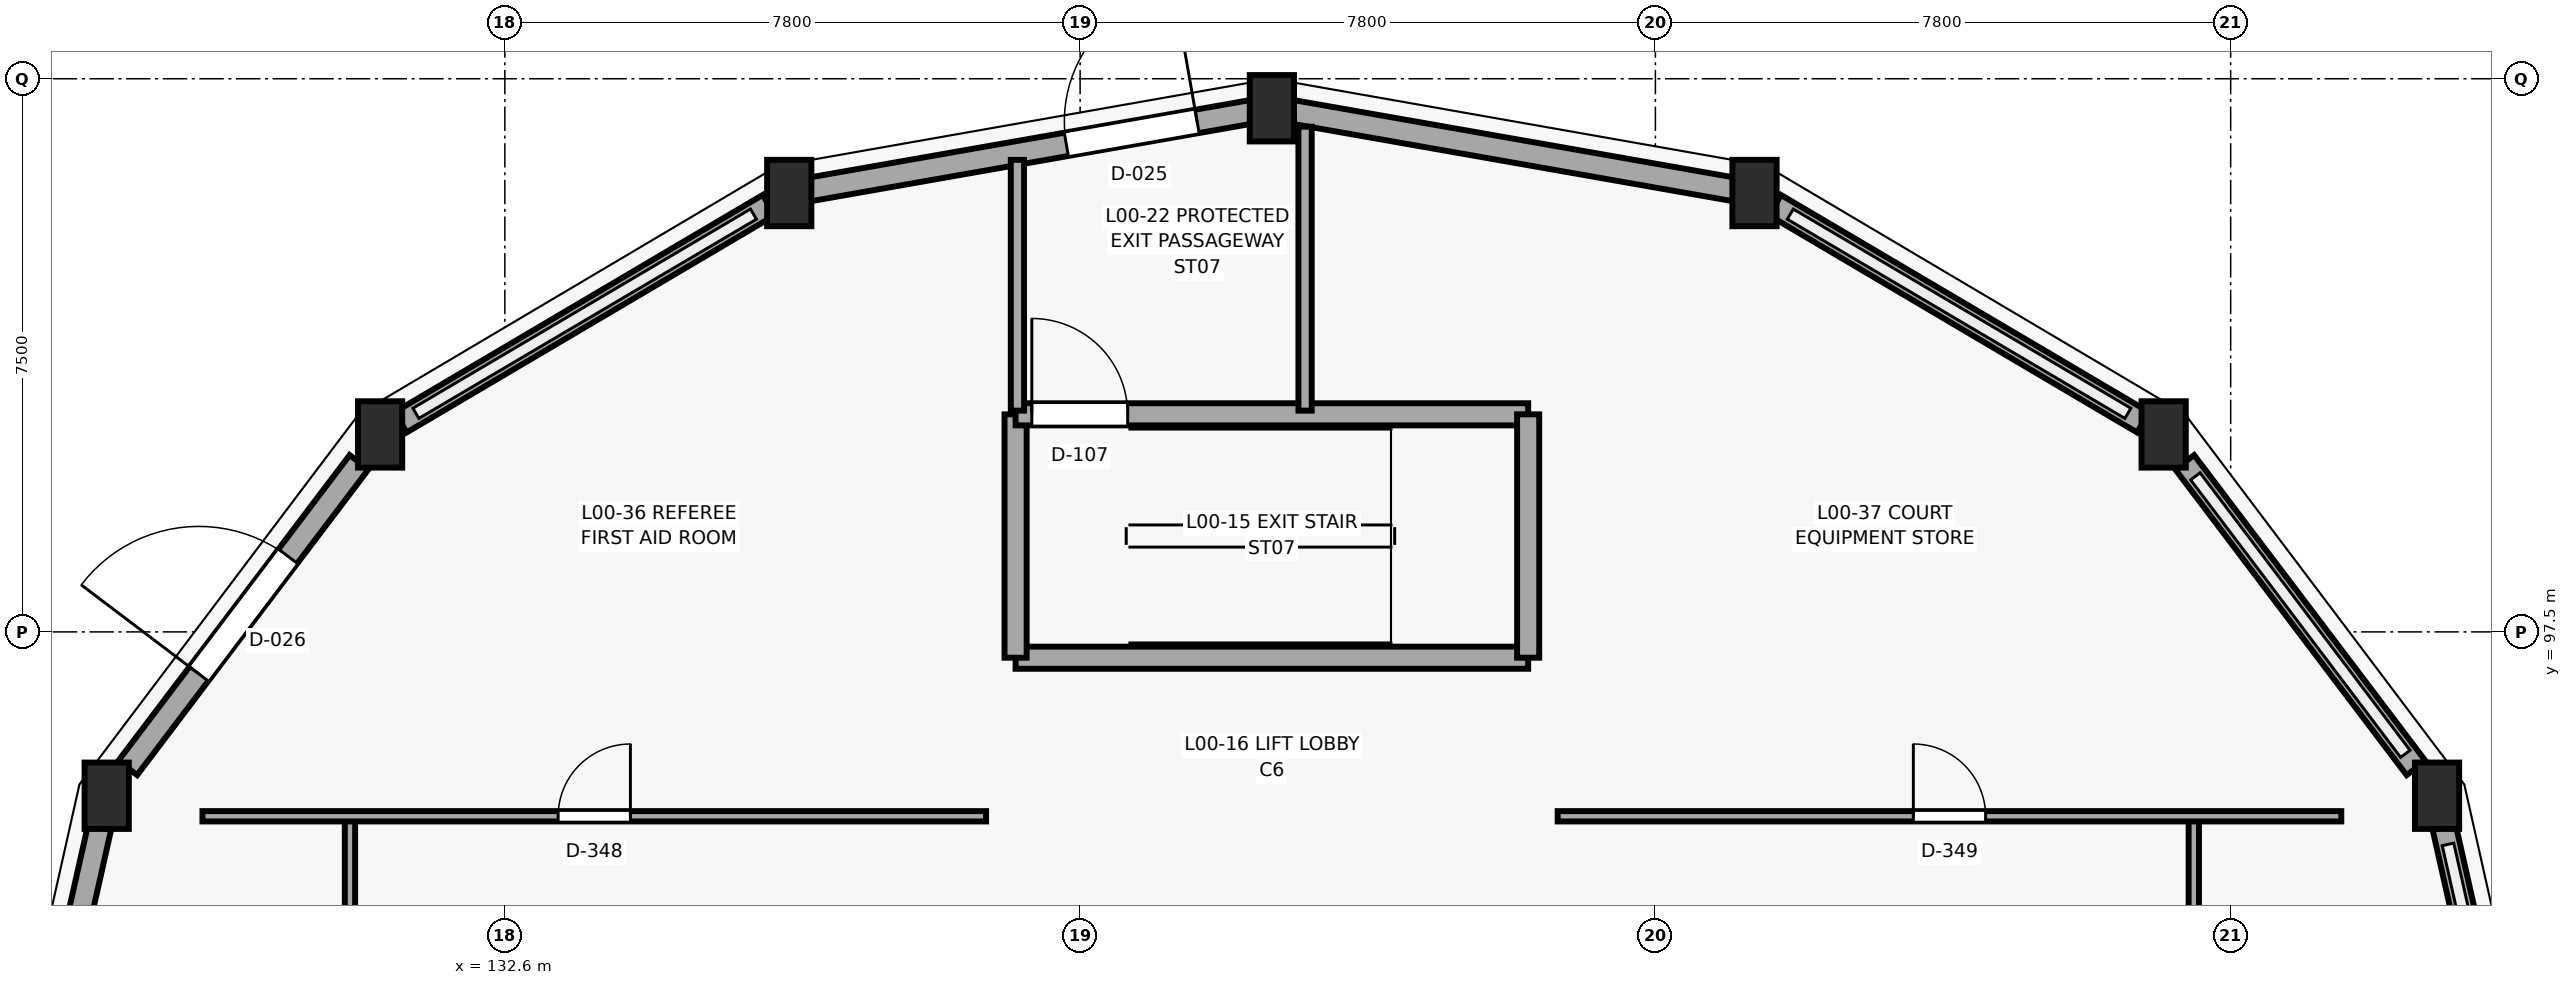
"""IFC4 building model, lengths in metres.
Left out: names, types, materials, properties, quantities, classifications, styles, units other than length and angle.
Written with IfcOpenShell. Run it as: python <this file> out.ifc"""

import sys

from ifc_helpers import new_model, si_unit, direction, frame, frame_2d, origin, origin_2d, place, context, subcontext, project, spatial, rectangle, extrude, element, fill, save


model = new_model("IFC4")
c1 = context("Model", 3, precision=1e-05, world=origin(), true_north=direction((0.0, 1.0)))
c2 = subcontext(c1, "Body", "Model", "MODEL_VIEW")
j1 = project(units=[si_unit("LENGTHUNIT", "METRE"), si_unit("PLANEANGLEUNIT", "RADIAN")], contexts=[c1])
p1 = place(None, origin())
s1 = spatial("IfcSite", under=j1, at=p1, CompositionType="ELEMENT")
p2 = place(p1, origin())
s2 = spatial("IfcBuilding", under=s1, at=p2, CompositionType="ELEMENT")
p3 = place(p2, origin())
s3 = spatial("IfcBuildingStorey", under=s2, at=p3, CompositionType="ELEMENT", Elevation=0.0)
for number, where, z_axis, x_axis in (
    (1, (158.798, 95.279, 0.0), (0.0, 0.0, 1.0), (1.0, 0.0, 0.0)),
    (2, (155.092, 100.177, 0.0), (0.0, 0.0, 1.0), (1.0, 0.0, 0.0)),
    (3, (149.544, 103.451, 0.0), (0.0, 0.0, 1.0), (1.0, 0.0, 0.0)),
    (4, (143.0, 104.6, 0.0), (0.0, 0.0, 1.0), (1.0, 0.0, 0.0)),
    (5, (136.456, 103.451, 0.0), (0.0, 0.0, 1.0), (1.0, 0.0, 0.0)),
    (6, (130.908, 100.177, 0.0), (0.0, 0.0, 1.0), (1.0, 0.0, 0.0)),
    (7, (127.202, 95.279, 0.0), (0.0, 0.0, 1.0), (1.0, 0.0, 0.0)),
):
    element("IfcColumn", number, at=place(p3, frame(where, z_axis=z_axis, x_axis=x_axis)), inside=s3, PredefinedType="COLUMN", context=c2, shape_type="SweptSolid", body=[
        extrude(rectangle(XDim=0.6, YDim=0.9, at=origin_2d()), origin(), (0.0, 0.0, 1.0), 4.5),
    ])
p4 = place(p3, frame((158.894, 94.853, 0.0), z_axis=(0.0, 0.0, 1.0), x_axis=(0.219744533343, -0.97555745093, 0.0)))
e8 = element("IfcWall", 8, at=p4, inside=s3, PredefinedType="STANDARD", context=c2, shape_type="SweptSolid", body=[
    extrude(rectangle(XDim=5.051, YDim=0.32, at=frame_2d((2.525, 0.0))), origin(), (0.0, 0.0, 1.0), 0.85),
])
p5 = place(p3, frame((155.376, 99.801, 0.0), z_axis=(0.0, 0.0, 1.0), x_axis=(0.603398282319, -0.797439974477, 0.0)))
e9 = element("IfcWall", 9, at=p5, inside=s3, PredefinedType="STANDARD", context=c2, shape_type="SweptSolid", body=[
    extrude(rectangle(XDim=5.199, YDim=0.32, at=frame_2d((2.599, 0.0))), origin(), (0.0, 0.0, 1.0), 0.85),
])
p6 = place(p3, frame((149.823, 103.286, 0.0), z_axis=(0.0, 0.0, 1.0), x_axis=(0.861235880181, -0.508205429614, 0.0)))
e10 = element("IfcWall", 10, at=p6, inside=s3, PredefinedType="STANDARD", context=c2, shape_type="SweptSolid", body=[
    extrude(rectangle(XDim=5.794, YDim=0.32, at=frame_2d((2.897, 0.0))), origin(), (0.0, 0.0, 1.0), 0.85),
])
p7 = place(p3, frame((143.275, 104.552, 0.0), z_axis=(0.0, 0.0, 1.0), x_axis=(0.984927418504, -0.172968148166, 0.0)))
e11 = element("IfcWall", 11, at=p7, inside=s3, PredefinedType="STANDARD", context=c2, shape_type="SweptSolid", body=[
    extrude(rectangle(XDim=6.085, YDim=0.32, at=frame_2d((3.042, 0.0))), origin(), (0.0, 0.0, 1.0), 3.445),
])
p8 = place(p7, frame((2.592, 0.0, 0.9)))
e12 = element("IfcOpeningElement", 12, at=p8, cuts=e11, PredefinedType="OPENING", context=c2, shape_type="SweptSolid", body=[
    extrude(rectangle(XDim=0.9, YDim=0.9, at=frame_2d((0.45, 0.45))), frame((0.0, 0.17, 0.0), z_axis=(0.0, -1.0, 0.0), x_axis=(1.0, 0.0, 0.0)), (0.0, 0.0, 1.0), 0.34),
])
p9 = place(p3, frame((136.731, 103.499, 0.0), z_axis=(0.0, 0.0, 1.0), x_axis=(0.984927418504, 0.172968148166, 0.0)))
e13 = element("IfcWall", 13, at=p9, inside=s3, PredefinedType="STANDARD", context=c2, shape_type="SweptSolid", body=[
    extrude(rectangle(XDim=6.085, YDim=0.32, at=frame_2d((3.042, 0.0))), origin(), (0.0, 0.0, 1.0), 3.445),
])
p10 = place(p9, frame((3.535, 0.0, 0.0)))
e14 = element("IfcOpeningElement", 14, at=p10, cuts=e13, PredefinedType="OPENING", context=c2, shape_type="SweptSolid", body=[
    extrude(rectangle(XDim=1.8, YDim=2.25, at=frame_2d((0.9, 1.125))), frame((0.0, 0.17, 0.0), z_axis=(0.0, -1.0, 0.0), x_axis=(1.0, 0.0, 0.0)), (0.0, 0.0, 1.0), 0.34),
])
p11 = place(p3, frame((131.187, 100.342, 0.0), z_axis=(0.0, 0.0, 1.0), x_axis=(0.861235880181, 0.508205429614, 0.0)))
e15 = element("IfcWall", 15, at=p11, inside=s3, PredefinedType="STANDARD", context=c2, shape_type="SweptSolid", body=[
    extrude(rectangle(XDim=5.794, YDim=0.32, at=frame_2d((2.897, 0.0))), origin(), (0.0, 0.0, 1.0), 0.85),
])
p12 = place(p3, frame((127.487, 95.655, 0.0), z_axis=(0.0, 0.0, 1.0), x_axis=(0.603398282319, 0.797439974477, 0.0)))
e16 = element("IfcWall", 16, at=p12, inside=s3, PredefinedType="STANDARD", context=c2, shape_type="SweptSolid", body=[
    extrude(rectangle(XDim=5.199, YDim=0.32, at=frame_2d((2.599, 0.0))), origin(), (0.0, 0.0, 1.0), 3.445),
])
p13 = place(p12, frame((1.599, 0.0, 0.0)))
e17 = element("IfcOpeningElement", 17, at=p13, cuts=e16, PredefinedType="OPENING", context=c2, shape_type="SweptSolid", body=[
    extrude(rectangle(XDim=2.0, YDim=2.3, at=frame_2d((1.0, 1.15))), frame((0.0, 0.17, 0.0), z_axis=(0.0, -1.0, 0.0), x_axis=(1.0, 0.0, 0.0)), (0.0, 0.0, 1.0), 0.34),
])
p14 = place(p3, frame((125.996, 89.926, 0.0), z_axis=(0.0, 0.0, 1.0), x_axis=(0.219744533343, 0.97555745093, 0.0)))
e18 = element("IfcWall", 18, at=p14, inside=s3, PredefinedType="STANDARD", context=c2, shape_type="SweptSolid", body=[
    extrude(rectangle(XDim=5.051, YDim=0.32, at=frame_2d((2.525, 0.0))), origin(), (0.0, 0.0, 1.0), 3.445),
])
p15 = place(p14, frame((1.45, 0.0, 0.9)))
e19 = element("IfcOpeningElement", 19, at=p15, cuts=e18, PredefinedType="OPENING", context=c2, shape_type="SweptSolid", body=[
    extrude(rectangle(XDim=2.15, YDim=1.55, at=frame_2d((1.075, 0.775))), frame((0.0, 0.17, 0.0), z_axis=(0.0, -1.0, 0.0), x_axis=(1.0, 0.0, 0.0)), (0.0, 0.0, 1.0), 0.34),
])
p16 = place(p3, frame((146.475, 97.15, 0.0), z_axis=(0.0, 0.0, 1.0), x_axis=(-1.0, 0.0, 0.0)))
e20 = element("IfcWall", 20, at=p16, inside=s3, PredefinedType="SHEAR", context=c2, shape_type="SweptSolid", body=[
    extrude(rectangle(XDim=6.95, YDim=0.3, at=frame_2d((3.475, 0.0))), origin(), (0.0, 0.0, 1.0), 4.5),
])
p17 = place(p3, frame((139.525, 97.15, 0.0), z_axis=(0.0, 0.0, 1.0), x_axis=(0.0, 1.0, 0.0)))
e21 = element("IfcWall", 21, at=p17, inside=s3, PredefinedType="SHEAR", context=c2, shape_type="SweptSolid", body=[
    extrude(rectangle(XDim=3.3, YDim=0.3, at=frame_2d((1.65, 0.0))), origin(), (0.0, 0.0, 1.0), 4.5),
])
p18 = place(p3, frame((139.525, 100.45, 0.0), z_axis=(0.0, 0.0, 1.0), x_axis=(1.0, 0.0, 0.0)))
e22 = element("IfcWall", 22, at=p18, inside=s3, PredefinedType="SHEAR", context=c2, shape_type="SweptSolid", body=[
    extrude(rectangle(XDim=6.95, YDim=0.3, at=frame_2d((3.475, 0.0))), origin(), (0.0, 0.0, 1.0), 4.5),
])
p19 = place(p18, frame((0.22, 0.0, 0.0)))
e23 = element("IfcOpeningElement", 23, at=p19, cuts=e22, PredefinedType="OPENING", context=c2, shape_type="SweptSolid", body=[
    extrude(rectangle(XDim=1.3, YDim=2.15, at=frame_2d((0.65, 1.075))), frame((0.0, 0.16, 0.0), z_axis=(0.0, -1.0, 0.0), x_axis=(1.0, 0.0, 0.0)), (0.0, 0.0, 1.0), 0.32),
])
p20 = place(p3, frame((146.475, 100.45, 0.0), z_axis=(0.0, 0.0, 1.0), x_axis=(0.0, -1.0, 0.0)))
e24 = element("IfcWall", 24, at=p20, inside=s3, PredefinedType="SHEAR", context=c2, shape_type="SweptSolid", body=[
    extrude(rectangle(XDim=3.3, YDim=0.3, at=frame_2d((1.65, 0.0))), origin(), (0.0, 0.0, 1.0), 4.5),
])
p21 = place(p3, frame((139.55, 100.5, 0.0), z_axis=(0.0, 0.0, 1.0), x_axis=(0.0, 1.0, 0.0)))
e25 = element("IfcWall", 25, at=p21, inside=s3, PredefinedType="PARTITIONING", context=c2, shape_type="SweptSolid", body=[
    extrude(rectangle(XDim=3.4, YDim=0.18, at=frame_2d((1.7, 0.0))), origin(), (0.0, 0.0, 1.0), 4.255),
])
p22 = place(p3, frame((143.45, 100.5, 0.0), z_axis=(0.0, 0.0, 1.0), x_axis=(0.0, 1.0, 0.0)))
e26 = element("IfcWall", 26, at=p22, inside=s3, PredefinedType="PARTITIONING", context=c2, shape_type="SweptSolid", body=[
    extrude(rectangle(XDim=3.85, YDim=0.18, at=frame_2d((1.925, 0.0))), origin(), (0.0, 0.0, 1.0), 4.255),
])
p23 = place(p3, frame((130.5, 78.0, 0.0), z_axis=(0.0, 0.0, 1.0), x_axis=(0.0, 1.0, 0.0)))
e27 = element("IfcWall", 27, at=p23, inside=s3, PredefinedType="PARTITIONING", context=c2, shape_type="SweptSolid", body=[
    extrude(rectangle(XDim=17.0, YDim=0.14, at=frame_2d((8.5, 0.0))), origin(), (0.0, 0.0, 1.0), 4.255),
])
p24 = place(p23, frame((7.94, 0.0, 0.0)))
e28 = element("IfcOpeningElement", 28, at=p24, cuts=e27, PredefinedType="OPENING", context=c2, shape_type="SweptSolid", body=[
    extrude(rectangle(XDim=1.12, YDim=2.1, at=frame_2d((0.56, 1.05))), frame((0.0, 0.08, 0.0), z_axis=(0.0, -1.0, 0.0), x_axis=(1.0, 0.0, 0.0)), (0.0, 0.0, 1.0), 0.16),
])
p25 = place(p3, frame((155.5, 78.0, 0.0), z_axis=(0.0, 0.0, 1.0), x_axis=(0.0, 1.0, 0.0)))
e29 = element("IfcWall", 29, at=p25, inside=s3, PredefinedType="PARTITIONING", context=c2, shape_type="SweptSolid", body=[
    extrude(rectangle(XDim=17.0, YDim=0.14, at=frame_2d((8.5, 0.0))), origin(), (0.0, 0.0, 1.0), 4.255),
])
p26 = place(p25, frame((7.94, 0.0, 0.0)))
e30 = element("IfcOpeningElement", 30, at=p26, cuts=e29, PredefinedType="OPENING", context=c2, shape_type="SweptSolid", body=[
    extrude(rectangle(XDim=1.12, YDim=2.1, at=frame_2d((0.56, 1.05))), frame((0.0, 0.08, 0.0), z_axis=(0.0, -1.0, 0.0), x_axis=(1.0, 0.0, 0.0)), (0.0, 0.0, 1.0), 0.16),
])
p27 = place(p3, frame((128.5, 95.0, 0.0), z_axis=(0.0, 0.0, 1.0), x_axis=(1.0, 0.0, 0.0)))
e31 = element("IfcWall", 31, at=p27, inside=s3, PredefinedType="PARTITIONING", context=c2, shape_type="SweptSolid", body=[
    extrude(rectangle(XDim=10.625, YDim=0.14, at=frame_2d((5.312, 0.0))), origin(), (0.0, 0.0, 1.0), 4.255),
])
p28 = place(p27, frame((4.823, 0.0, 0.0)))
e32 = element("IfcOpeningElement", 32, at=p28, cuts=e31, PredefinedType="OPENING", context=c2, shape_type="SweptSolid", body=[
    extrude(rectangle(XDim=0.98, YDim=2.1, at=frame_2d((0.49, 1.05))), frame((0.0, 0.08, 0.0), z_axis=(0.0, -1.0, 0.0), x_axis=(1.0, 0.0, 0.0)), (0.0, 0.0, 1.0), 0.16),
])
p29 = place(p3, frame((146.875, 95.0, 0.0), z_axis=(0.0, 0.0, 1.0), x_axis=(1.0, 0.0, 0.0)))
e33 = element("IfcWall", 33, at=p29, inside=s3, PredefinedType="PARTITIONING", context=c2, shape_type="SweptSolid", body=[
    extrude(rectangle(XDim=10.625, YDim=0.14, at=frame_2d((5.312, 0.0))), origin(), (0.0, 0.0, 1.0), 4.255),
])
p30 = place(p29, frame((4.823, 0.0, 0.0)))
e34 = element("IfcOpeningElement", 34, at=p30, cuts=e33, PredefinedType="OPENING", context=c2, shape_type="SweptSolid", body=[
    extrude(rectangle(XDim=0.98, YDim=2.1, at=frame_2d((0.49, 1.05))), frame((0.0, 0.08, 0.0), z_axis=(0.0, -1.0, 0.0), x_axis=(1.0, 0.0, 0.0)), (0.0, 0.0, 1.0), 0.16),
])
p31 = place(p8, origin())
e35 = element("IfcWindow", 35, at=p31, inside=s3, PartitioningType="SINGLE_PANEL", PredefinedType="WINDOW", context=c2, shape_type="SweptSolid", body=[
    extrude(rectangle(XDim=0.9, YDim=0.9, at=frame_2d((0.45, 0.45))), frame((0.0, 0.03, 0.0), z_axis=(0.0, -1.0, 0.0), x_axis=(1.0, 0.0, 0.0)), (0.0, 0.0, 1.0), 0.06),
])
fill(e12, e35)
p32 = place(p10, origin())
e36 = element("IfcDoor", 36, at=p32, inside=s3, OperationType="SINGLE_SWING_RIGHT", PredefinedType="DOOR", context=c2, shape_type="SweptSolid", body=[
    extrude(rectangle(XDim=1.8, YDim=2.25, at=frame_2d((0.9, 1.125))), frame((0.0, 0.025, 0.0), z_axis=(0.0, -1.0, 0.0), x_axis=(1.0, 0.0, 0.0)), (0.0, 0.0, 1.0), 0.05),
])
fill(e14, e36)
p33 = place(p13, origin())
e37 = element("IfcDoor", 37, at=p33, inside=s3, OperationType="SINGLE_SWING_LEFT", PredefinedType="DOOR", context=c2, shape_type="SweptSolid", body=[
    extrude(rectangle(XDim=2.0, YDim=2.3, at=frame_2d((1.0, 1.15))), frame((0.0, 0.025, 0.0), z_axis=(0.0, -1.0, 0.0), x_axis=(1.0, 0.0, 0.0)), (0.0, 0.0, 1.0), 0.05),
])
fill(e17, e37)
p34 = place(p19, origin())
e38 = element("IfcDoor", 38, at=p34, inside=s3, OperationType="SINGLE_SWING_LEFT", PredefinedType="DOOR", context=c2, shape_type="SweptSolid", body=[
    extrude(rectangle(XDim=1.3, YDim=2.15, at=frame_2d((0.65, 1.075))), frame((0.0, 0.025, 0.0), z_axis=(0.0, -1.0, 0.0), x_axis=(1.0, 0.0, 0.0)), (0.0, 0.0, 1.0), 0.05),
])
fill(e23, e38)
p35 = place(p28, origin())
e39 = element("IfcDoor", 39, at=p35, inside=s3, OperationType="SINGLE_SWING_RIGHT", PredefinedType="DOOR", context=c2, shape_type="SweptSolid", body=[
    extrude(rectangle(XDim=0.98, YDim=2.1, at=frame_2d((0.49, 1.05))), frame((0.0, 0.025, 0.0), z_axis=(0.0, -1.0, 0.0), x_axis=(1.0, 0.0, 0.0)), (0.0, 0.0, 1.0), 0.05),
])
fill(e32, e39)
p36 = place(p30, origin())
e40 = element("IfcDoor", 40, at=p36, inside=s3, OperationType="SINGLE_SWING_LEFT", PredefinedType="DOOR", context=c2, shape_type="SweptSolid", body=[
    extrude(rectangle(XDim=0.98, YDim=2.1, at=frame_2d((0.49, 1.05))), frame((0.0, 0.025, 0.0), z_axis=(0.0, -1.0, 0.0), x_axis=(1.0, 0.0, 0.0)), (0.0, 0.0, 1.0), 0.05),
])
fill(e34, e40)
save(model, sys.argv[1])
